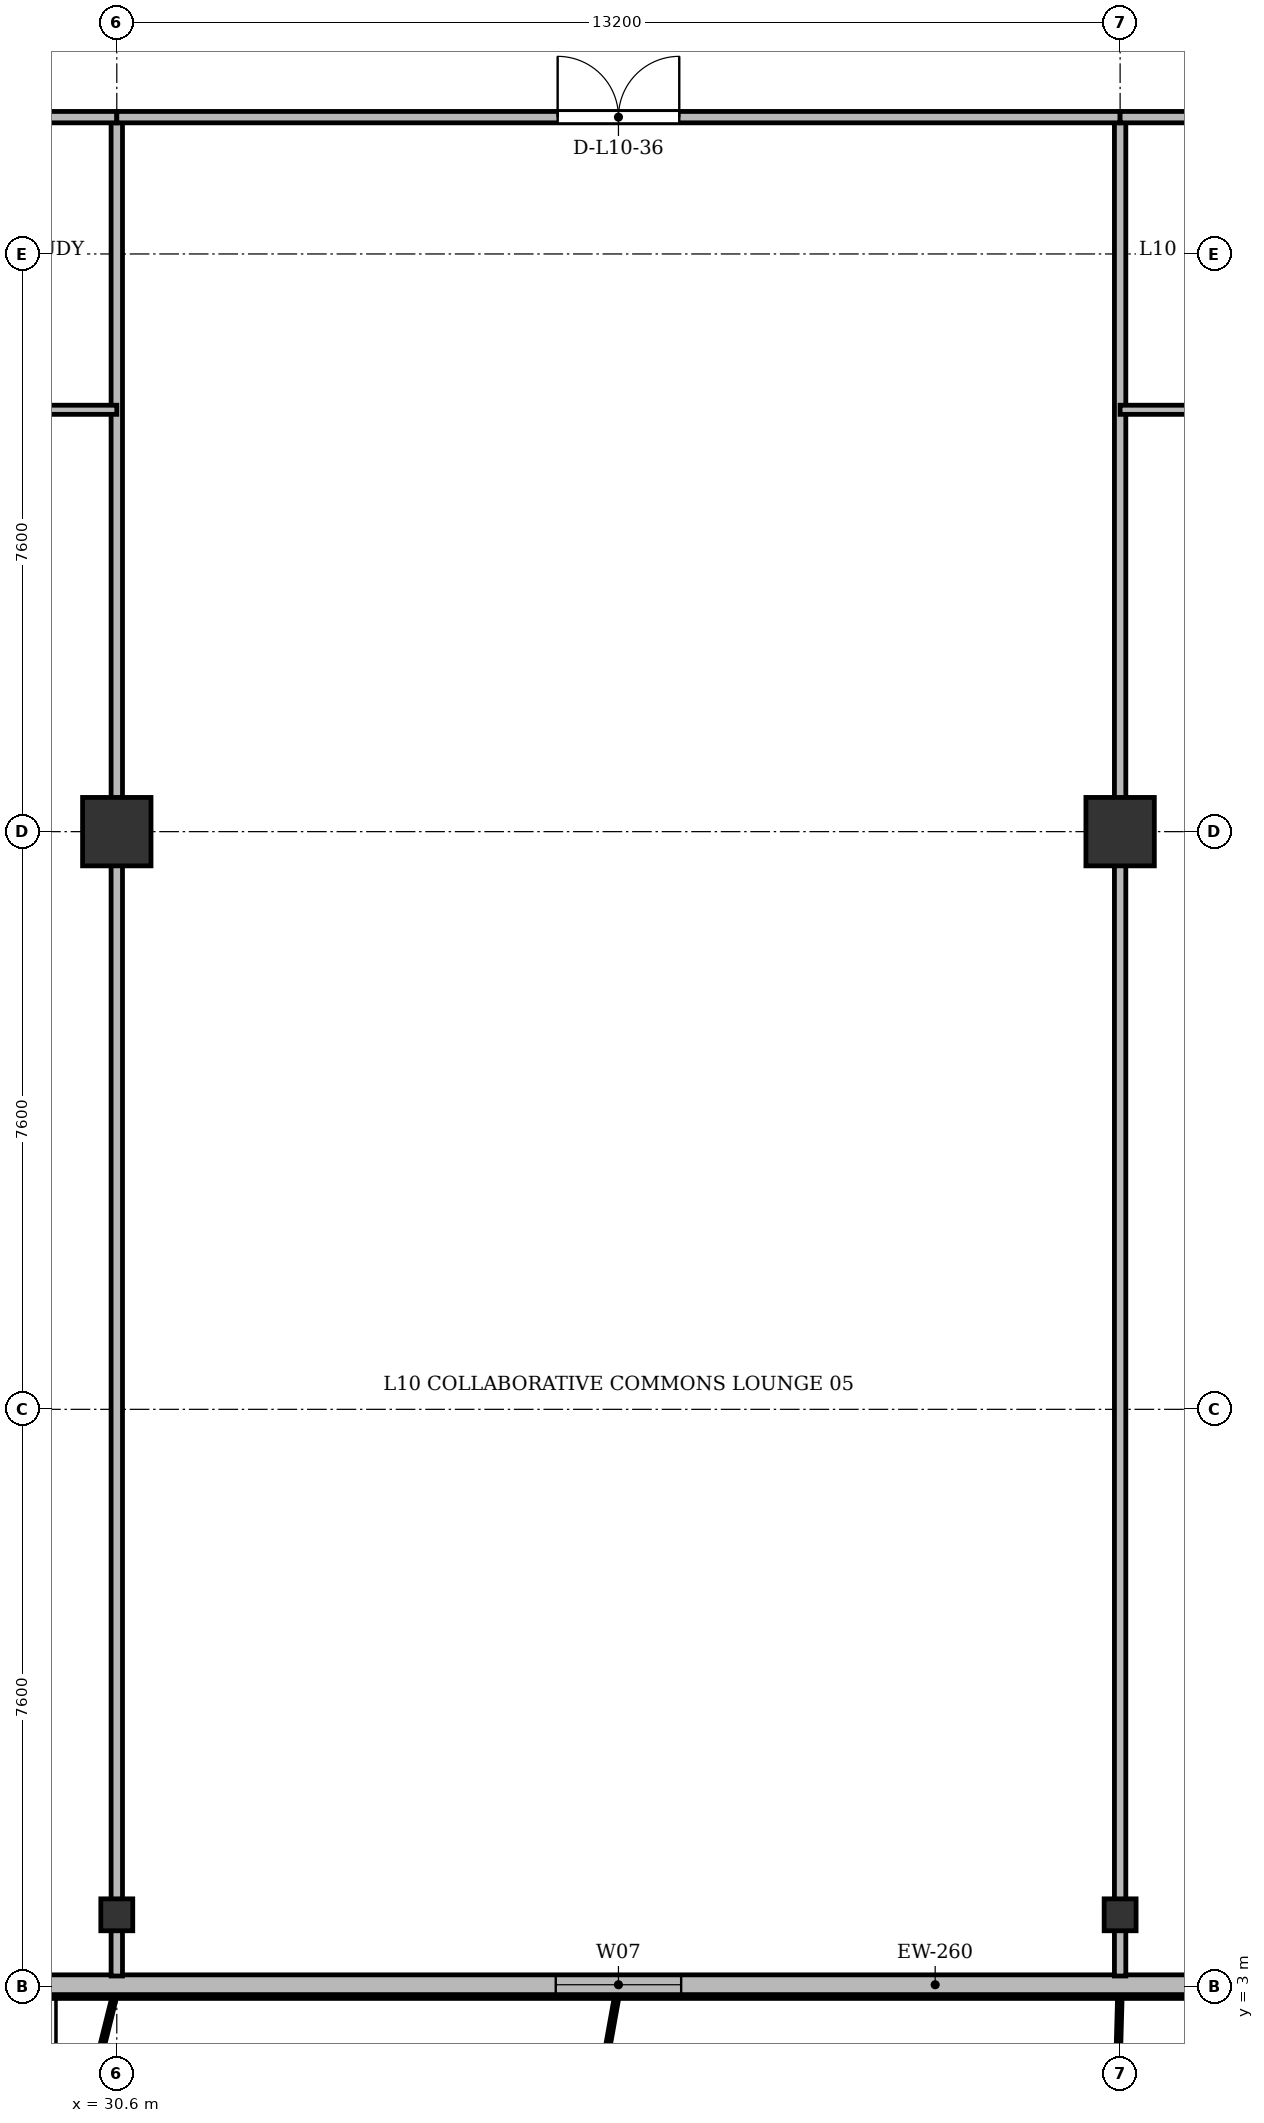
"""IFC4 building model, lengths in metres.
Left out: names, types, materials, properties, quantities, classifications, styles, units other than length and angle.
Written with IfcOpenShell. Run it as: python <this file> out.ifc"""

import sys

from ifc_helpers import new_model, si_unit, direction, frame, frame_2d, origin, origin_2d, place, context, subcontext, project, spatial, rectangle, i_section, extrude, source, transform, mapped, element, fill, save


model = new_model("IFC4")
c1 = context("Model", 3, precision=1e-05, world=origin(), true_north=direction((0.0, 1.0)))
c2 = subcontext(c1, "Body", "Model", "MODEL_VIEW")
j1 = project(units=[si_unit("LENGTHUNIT", "METRE"), si_unit("PLANEANGLEUNIT", "RADIAN")], contexts=[c1])
p1 = place(None, origin())
s1 = spatial("IfcSite", under=j1, at=p1, CompositionType="ELEMENT")
p2 = place(p1, origin())
s2 = spatial("IfcBuilding", under=s1, at=p2, CompositionType="ELEMENT")
p3 = place(p2, frame((0.0, 0.0, 41.5)))
s3 = spatial("IfcBuildingStorey", under=s2, at=p3, CompositionType="ELEMENT", Elevation=41.5)
m1 = source(origin(), c2, "Body", "SweptSolid", [
    extrude(i_section(OverallWidth=0.42, OverallDepth=0.42, WebThickness=0.026, FlangeThickness=0.04, at=origin_2d()), origin(), (0.0, 0.0, 1.0), 3.6),
])
p4 = place(p3, frame((30.6, 3.95, 0.0), z_axis=(0.0, 0.0, 1.0), x_axis=(1.0, 0.0, 0.0)))
e1 = element("IfcColumn", 1, at=p4, inside=s3, PredefinedType="COLUMN", context=c2, shape_type="MappedRepresentation", body=[
    mapped(m1, transform((0.0, 0.0, 0.0), x_axis=(1.0, 0.0, 0.0), y_axis=(0.0, 1.0, 0.0), z_axis=(0.0, 0.0, 1.0), scale=1.0)),
])
m2 = source(origin(), c2, "Body", "SweptSolid", [
    extrude(rectangle(XDim=0.9, YDim=0.9, at=origin_2d()), origin(), (0.0, 0.0, 1.0), 3.6),
])
p5 = place(p3, frame((30.6, 18.2, 0.0), z_axis=(0.0, 0.0, 1.0), x_axis=(1.0, 0.0, 0.0)))
e2 = element("IfcColumn", 2, at=p5, inside=s3, PredefinedType="COLUMN", context=c2, shape_type="MappedRepresentation", body=[
    mapped(m2, transform((0.0, 0.0, 0.0), x_axis=(1.0, 0.0, 0.0), y_axis=(0.0, 1.0, 0.0), z_axis=(0.0, 0.0, 1.0), scale=1.0)),
])
p6 = place(p3, frame((43.8, 3.95, 0.0), z_axis=(0.0, 0.0, 1.0), x_axis=(1.0, 0.0, 0.0)))
e3 = element("IfcColumn", 3, at=p6, inside=s3, PredefinedType="COLUMN", context=c2, shape_type="MappedRepresentation", body=[
    mapped(m1, transform((0.0, 0.0, 0.0), x_axis=(1.0, 0.0, 0.0), y_axis=(0.0, 1.0, 0.0), z_axis=(0.0, 0.0, 1.0), scale=1.0)),
])
p7 = place(p3, frame((43.8, 18.2, 0.0), z_axis=(0.0, 0.0, 1.0), x_axis=(1.0, 0.0, 0.0)))
e4 = element("IfcColumn", 4, at=p7, inside=s3, PredefinedType="COLUMN", context=c2, shape_type="MappedRepresentation", body=[
    mapped(m2, transform((0.0, 0.0, 0.0), x_axis=(1.0, 0.0, 0.0), y_axis=(0.0, 1.0, 0.0), z_axis=(0.0, 0.0, 1.0), scale=1.0)),
])
p8 = place(p3, frame((66.9, 3.03, 0.0), z_axis=(0.0, 0.0, 1.0), x_axis=(-1.0, 0.0, 0.0)))
e5 = element("IfcWall", 5, at=p8, inside=s3, PredefinedType="SOLIDWALL", context=c2, shape_type="SweptSolid", body=[
    extrude(rectangle(XDim=59.4, YDim=0.26, at=frame_2d((29.7, 0.0))), origin(), (0.0, 0.0, 1.0), 3.34),
])
p9 = place(p8, frame((3.6, 0.0, 0.9)))
e6 = element("IfcOpeningElement", 6, at=p9, cuts=e5, PredefinedType="OPENING", context=c2, shape_type="SweptSolid", body=[
    extrude(rectangle(XDim=2.2, YDim=1.8, at=frame_2d((1.1, 0.9))), frame((0.0, 0.14, 0.0), z_axis=(0.0, -1.0, 0.0), x_axis=(1.0, 0.0, 0.0)), (0.0, 0.0, 1.0), 0.28),
])
p10 = place(p8, frame((9.565, 0.0, 0.0)))
e7 = element("IfcOpeningElement", 7, at=p10, cuts=e5, PredefinedType="OPENING", context=c2, shape_type="SweptSolid", body=[
    extrude(rectangle(XDim=1.2, YDim=2.2, at=frame_2d((0.6, 1.1))), frame((0.0, 0.14, 0.0), z_axis=(0.0, -1.0, 0.0), x_axis=(1.0, 0.0, 0.0)), (0.0, 0.0, 1.0), 0.28),
])
p11 = place(p8, frame((18.5, 0.0, 0.9)))
e8 = element("IfcOpeningElement", 8, at=p11, cuts=e5, PredefinedType="OPENING", context=c2, shape_type="SweptSolid", body=[
    extrude(rectangle(XDim=2.0, YDim=1.95, at=frame_2d((1.0, 0.975))), frame((0.0, 0.14, 0.0), z_axis=(0.0, -1.0, 0.0), x_axis=(1.0, 0.0, 0.0)), (0.0, 0.0, 1.0), 0.28),
])
p12 = place(p8, frame((28.875, 0.0, 0.9)))
e9 = element("IfcOpeningElement", 9, at=p12, cuts=e5, PredefinedType="OPENING", context=c2, shape_type="SweptSolid", body=[
    extrude(rectangle(XDim=1.65, YDim=1.85, at=frame_2d((0.825, 0.925))), frame((0.0, 0.14, 0.0), z_axis=(0.0, -1.0, 0.0), x_axis=(1.0, 0.0, 0.0)), (0.0, 0.0, 1.0), 0.28),
])
p13 = place(p8, frame((40.301, 0.0, 0.0)))
e10 = element("IfcOpeningElement", 10, at=p13, cuts=e5, PredefinedType="OPENING", context=c2, shape_type="SweptSolid", body=[
    extrude(rectangle(XDim=1.2, YDim=2.2, at=frame_2d((0.6, 1.1))), frame((0.0, 0.14, 0.0), z_axis=(0.0, -1.0, 0.0), x_axis=(1.0, 0.0, 0.0)), (0.0, 0.0, 1.0), 0.28),
])
p14 = place(p8, frame((46.3, 0.0, 0.9)))
e11 = element("IfcOpeningElement", 11, at=p14, cuts=e5, PredefinedType="OPENING", context=c2, shape_type="SweptSolid", body=[
    extrude(rectangle(XDim=2.2, YDim=1.8, at=frame_2d((1.1, 0.9))), frame((0.0, 0.14, 0.0), z_axis=(0.0, -1.0, 0.0), x_axis=(1.0, 0.0, 0.0)), (0.0, 0.0, 1.0), 0.28),
])
p15 = place(p8, frame((55.817, 0.0, 0.0)))
e12 = element("IfcOpeningElement", 12, at=p15, cuts=e5, PredefinedType="OPENING", context=c2, shape_type="SweptSolid", body=[
    extrude(rectangle(XDim=1.2, YDim=2.2, at=frame_2d((0.6, 1.1))), frame((0.0, 0.14, 0.0), z_axis=(0.0, -1.0, 0.0), x_axis=(1.0, 0.0, 0.0)), (0.0, 0.0, 1.0), 0.28),
])
for number, where, z_axis, x_axis in (
    (13, (30.6, 3.145, 0.0), (0.0, 0.0, 1.0), (0.0, 1.0, 0.0)),
    (14, (43.8, 3.145, 0.0), (0.0, 0.0, 1.0), (0.0, 1.0, 0.0)),
):
    element("IfcWall", number, at=place(p3, frame(where, z_axis=z_axis, x_axis=x_axis)), inside=s3, PredefinedType="PARTITIONING", context=c2, shape_type="SweptSolid", body=[
        extrude(rectangle(XDim=24.455, YDim=0.15, at=frame_2d((12.228, 0.0))), origin(), (0.0, 0.0, 1.0), 2.752),
    ])
p16 = place(p3, frame((23.4, 27.6, 0.0), z_axis=(0.0, 0.0, 1.0), x_axis=(1.0, 0.0, 0.0)))
e15 = element("IfcWall", 15, at=p16, inside=s3, PredefinedType="PARTITIONING", context=c2, shape_type="SweptSolid", body=[
    extrude(rectangle(XDim=7.2, YDim=0.15, at=frame_2d((3.6, 0.0))), origin(), (0.0, 0.0, 1.0), 2.752),
])
p17 = place(p16, frame((3.125, 0.0, 0.0)))
e16 = element("IfcOpeningElement", 16, at=p17, cuts=e15, PredefinedType="OPENING", context=c2, shape_type="SweptSolid", body=[
    extrude(rectangle(XDim=0.95, YDim=2.15, at=frame_2d((0.475, 1.075))), frame((0.0, 0.085, 0.0), z_axis=(0.0, -1.0, 0.0), x_axis=(1.0, 0.0, 0.0)), (0.0, 0.0, 1.0), 0.17),
])
p18 = place(p3, frame((23.4, 23.75, 0.0), z_axis=(0.0, 0.0, 1.0), x_axis=(1.0, 0.0, 0.0)))
e17 = element("IfcWall", 17, at=p18, inside=s3, PredefinedType="PARTITIONING", context=c2, shape_type="SweptSolid", body=[
    extrude(rectangle(XDim=7.2, YDim=0.12, at=frame_2d((3.6, 0.0))), origin(), (0.0, 0.0, 1.0), 2.752),
])
p19 = place(p18, frame((3.125, 0.0, 0.0)))
e18 = element("IfcOpeningElement", 18, at=p19, cuts=e17, PredefinedType="OPENING", context=c2, shape_type="SweptSolid", body=[
    extrude(rectangle(XDim=0.95, YDim=2.15, at=frame_2d((0.475, 1.075))), frame((0.0, 0.07, 0.0), z_axis=(0.0, -1.0, 0.0), x_axis=(1.0, 0.0, 0.0)), (0.0, 0.0, 1.0), 0.14),
])
p20 = place(p3, frame((30.6, 27.6, 0.0), z_axis=(0.0, 0.0, 1.0), x_axis=(1.0, 0.0, 0.0)))
e19 = element("IfcWall", 19, at=p20, inside=s3, PredefinedType="PARTITIONING", context=c2, shape_type="SweptSolid", body=[
    extrude(rectangle(XDim=13.2, YDim=0.15, at=frame_2d((6.6, 0.0))), origin(), (0.0, 0.0, 1.0), 2.752),
])
p21 = place(p20, frame((5.8, 0.0, 0.0)))
e20 = element("IfcOpeningElement", 20, at=p21, cuts=e19, PredefinedType="OPENING", context=c2, shape_type="SweptSolid", body=[
    extrude(rectangle(XDim=1.6, YDim=2.2, at=frame_2d((0.8, 1.1))), frame((0.0, 0.085, 0.0), z_axis=(0.0, -1.0, 0.0), x_axis=(1.0, 0.0, 0.0)), (0.0, 0.0, 1.0), 0.17),
])
p22 = place(p3, frame((43.8, 27.6, 0.0), z_axis=(0.0, 0.0, 1.0), x_axis=(1.0, 0.0, 0.0)))
e21 = element("IfcWall", 21, at=p22, inside=s3, PredefinedType="PARTITIONING", context=c2, shape_type="SweptSolid", body=[
    extrude(rectangle(XDim=7.2, YDim=0.15, at=frame_2d((3.6, 0.0))), origin(), (0.0, 0.0, 1.0), 2.752),
])
p23 = place(p22, frame((3.125, 0.0, 0.0)))
e22 = element("IfcOpeningElement", 22, at=p23, cuts=e21, PredefinedType="OPENING", context=c2, shape_type="SweptSolid", body=[
    extrude(rectangle(XDim=0.95, YDim=2.15, at=frame_2d((0.475, 1.075))), frame((0.0, 0.085, 0.0), z_axis=(0.0, -1.0, 0.0), x_axis=(1.0, 0.0, 0.0)), (0.0, 0.0, 1.0), 0.17),
])
p24 = place(p3, frame((43.8, 23.75, 0.0), z_axis=(0.0, 0.0, 1.0), x_axis=(1.0, 0.0, 0.0)))
e23 = element("IfcWall", 23, at=p24, inside=s3, PredefinedType="PARTITIONING", context=c2, shape_type="SweptSolid", body=[
    extrude(rectangle(XDim=7.2, YDim=0.12, at=frame_2d((3.6, 0.0))), origin(), (0.0, 0.0, 1.0), 2.752),
])
p25 = place(p24, frame((3.125, 0.0, 0.0)))
e24 = element("IfcOpeningElement", 24, at=p25, cuts=e23, PredefinedType="OPENING", context=c2, shape_type="SweptSolid", body=[
    extrude(rectangle(XDim=0.95, YDim=2.15, at=frame_2d((0.475, 1.075))), frame((0.0, 0.07, 0.0), z_axis=(0.0, -1.0, 0.0), x_axis=(1.0, 0.0, 0.0)), (0.0, 0.0, 1.0), 0.14),
])
m3 = source(origin(), c2, "Body", "SweptSolid", [
    extrude(rectangle(XDim=1.65, YDim=1.85, at=frame_2d((0.825, 0.925))), frame((0.0, 0.03, 0.0), z_axis=(0.0, -1.0, 0.0), x_axis=(1.0, 0.0, 0.0)), (0.0, 0.0, 1.0), 0.06),
])
p26 = place(p12, origin())
e25 = element("IfcWindow", 25, at=p26, inside=s3, PartitioningType="SINGLE_PANEL", PredefinedType="WINDOW", context=c2, shape_type="MappedRepresentation", body=[
    mapped(m3, transform((0.0, 0.0, 0.0), x_axis=(1.0, 0.0, 0.0), y_axis=(0.0, 1.0, 0.0), z_axis=(0.0, 0.0, 1.0), scale=1.0)),
])
fill(e9, e25)
m4 = source(origin(), c2, "Body", "SweptSolid", [
    extrude(rectangle(XDim=1.6, YDim=2.2, at=frame_2d((0.8, 1.1))), frame((0.0, 0.025, 0.0), z_axis=(0.0, -1.0, 0.0), x_axis=(1.0, 0.0, 0.0)), (0.0, 0.0, 1.0), 0.05),
])
p27 = place(p21, origin())
e26 = element("IfcDoor", 26, at=p27, inside=s3, OperationType="DOUBLE_DOOR_SINGLE_SWING", PredefinedType="DOOR", context=c2, shape_type="MappedRepresentation", body=[
    mapped(m4, transform((0.0, 0.0, 0.0), x_axis=(1.0, 0.0, 0.0), y_axis=(0.0, 1.0, 0.0), z_axis=(0.0, 0.0, 1.0), scale=1.0)),
])
fill(e20, e26)
save(model, sys.argv[1])
